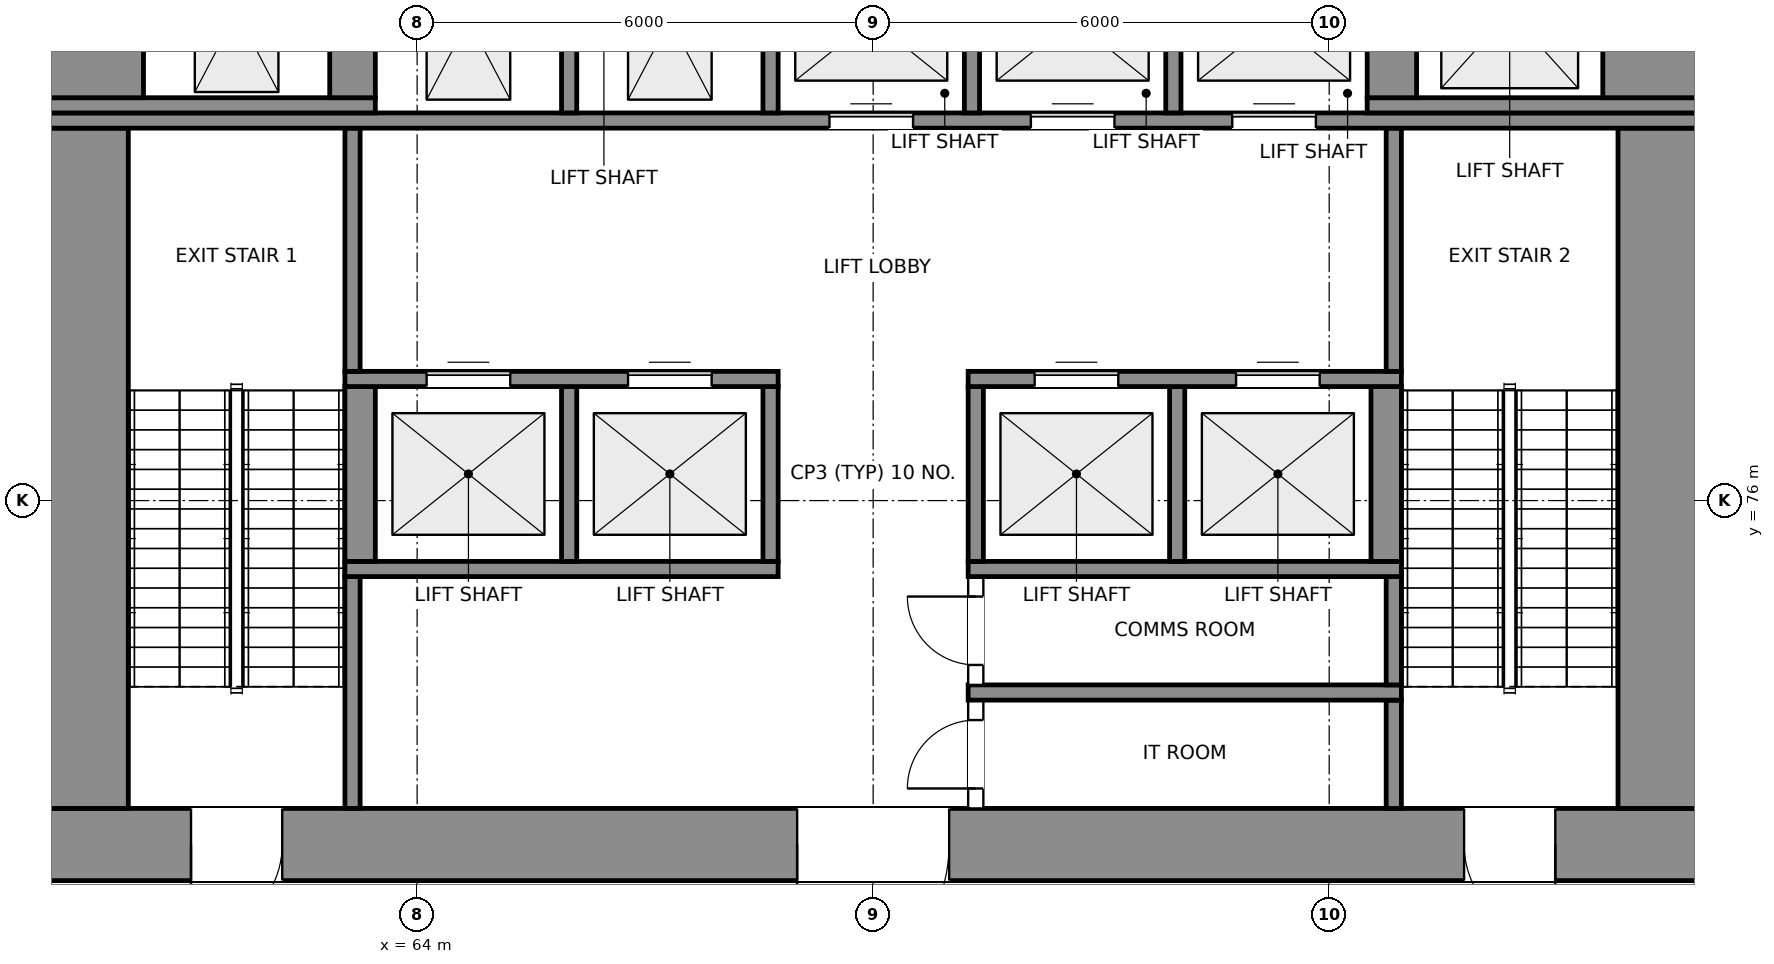
"""IFC4 building model, lengths in metres.
Left out: names, types, materials, properties, quantities, classifications, styles, units other than length and angle.
Written with IfcOpenShell. Run it as: python <this file> out.ifc"""

import sys

from ifc_helpers import new_model, si_unit, direction, frame, frame_2d, origin, place, context, subcontext, project, spatial, rectangle, extrude, element, fill, save


model = new_model("IFC4")
c1 = context("Model", 3, precision=1e-05, world=origin(), true_north=direction((0.0, 1.0)))
c2 = subcontext(c1, "Body", "Model", "MODEL_VIEW")
j1 = project(units=[si_unit("LENGTHUNIT", "METRE"), si_unit("PLANEANGLEUNIT", "RADIAN")], contexts=[c1])
p1 = place(None, origin())
s1 = spatial("IfcSite", under=j1, at=p1, CompositionType="ELEMENT")
p2 = place(p1, origin())
s2 = spatial("IfcBuilding", under=s1, at=p2, CompositionType="ELEMENT")
p3 = place(p2, frame((0.0, 0.0, 142.6)))
s3 = spatial("IfcBuildingStorey", under=s2, at=p3, CompositionType="ELEMENT", Elevation=142.6)
p4 = place(p3, frame((59.0, 71.475, 0.0), z_axis=(0.0, 0.0, 1.0), x_axis=(1.0, 0.0, 0.0)))
e1 = element("IfcWall", 1, at=p4, inside=s3, PredefinedType="SHEAR", context=c2, shape_type="SweptSolid", body=[
    extrude(rectangle(XDim=22.0, YDim=0.95, at=frame_2d((11.0, 0.0))), origin(), (0.0, 0.0, 1.0), 6.0),
])
p5 = place(p4, frame((2.025, 0.0, 0.0)))
e2 = element("IfcOpeningElement", 2, at=p5, cuts=e1, PredefinedType="OPENING", context=c2, shape_type="SweptSolid", body=[
    extrude(rectangle(XDim=1.2, YDim=2.1, at=frame_2d((0.6, 1.05))), frame((0.0, 0.485, 0.0), z_axis=(0.0, -1.0, 0.0), x_axis=(1.0, 0.0, 0.0)), (0.0, 0.0, 1.0), 0.97),
])
p6 = place(p4, frame((18.775, 0.0, 0.0)))
e3 = element("IfcOpeningElement", 3, at=p6, cuts=e1, PredefinedType="OPENING", context=c2, shape_type="SweptSolid", body=[
    extrude(rectangle(XDim=1.2, YDim=2.1, at=frame_2d((0.6, 1.05))), frame((0.0, 0.485, 0.0), z_axis=(0.0, -1.0, 0.0), x_axis=(1.0, 0.0, 0.0)), (0.0, 0.0, 1.0), 0.97),
])
p7 = place(p4, frame((10.0, 0.0, 0.0)))
e4 = element("IfcOpeningElement", 4, at=p7, cuts=e1, PredefinedType="OPENING", context=c2, shape_type="SweptSolid", body=[
    extrude(rectangle(XDim=2.0, YDim=2.1, at=frame_2d((1.0, 1.05))), frame((0.0, 0.485, 0.0), z_axis=(0.0, -1.0, 0.0), x_axis=(1.0, 0.0, 0.0)), (0.0, 0.0, 1.0), 0.97),
])
p8 = place(p3, frame((59.6, 71.95, 0.0), z_axis=(0.0, 0.0, 1.0), x_axis=(0.0, 1.0, 0.0)))
e5 = element("IfcWall", 5, at=p8, inside=s3, PredefinedType="SHEAR", context=c2, shape_type="SweptSolid", body=[
    extrude(rectangle(XDim=8.95, YDim=1.2, at=frame_2d((4.475, 0.0))), origin(), (0.0, 0.0, 1.0), 6.0),
])
p9 = place(p3, frame((63.15, 71.95, 0.0), z_axis=(0.0, 0.0, 1.0), x_axis=(0.0, 1.0, 0.0)))
e6 = element("IfcWall", 6, at=p9, inside=s3, PredefinedType="SHEAR", context=c2, shape_type="SweptSolid", body=[
    extrude(rectangle(XDim=3.05, YDim=0.2, at=frame_2d((1.525, 0.0))), origin(), (0.0, 0.0, 1.0), 6.0),
])
p10 = place(p3, frame((71.35, 71.95, 0.0), z_axis=(0.0, 0.0, 1.0), x_axis=(0.0, 1.0, 0.0)))
e7 = element("IfcWall", 7, at=p10, inside=s3, PredefinedType="PARTITIONING", context=c2, shape_type="SweptSolid", body=[
    extrude(rectangle(XDim=1.425, YDim=0.2, at=frame_2d((0.712, 0.0))), origin(), (0.0, 0.0, 1.0), 5.7),
])
p11 = place(p10, frame((0.262, 0.0, 0.0)))
e8 = element("IfcOpeningElement", 8, at=p11, cuts=e7, PredefinedType="OPENING", context=c2, shape_type="SweptSolid", body=[
    extrude(rectangle(XDim=0.9, YDim=2.1, at=frame_2d((0.45, 1.05))), frame((0.0, 0.11, 0.0), z_axis=(0.0, -1.0, 0.0), x_axis=(1.0, 0.0, 0.0)), (0.0, 0.0, 1.0), 0.22),
])
p12 = place(p3, frame((76.85, 71.95, 0.0), z_axis=(0.0, 0.0, 1.0), x_axis=(0.0, 1.0, 0.0)))
e9 = element("IfcWall", 9, at=p12, inside=s3, PredefinedType="SHEAR", context=c2, shape_type="SweptSolid", body=[
    extrude(rectangle(XDim=1.425, YDim=0.2, at=frame_2d((0.712, 0.0))), origin(), (0.0, 0.0, 1.0), 6.0),
])
p13 = place(p3, frame((80.4, 71.95, 0.0), z_axis=(0.0, 0.0, 1.0), x_axis=(0.0, 1.0, 0.0)))
e10 = element("IfcWall", 10, at=p13, inside=s3, PredefinedType="SHEAR", context=c2, shape_type="SweptSolid", body=[
    extrude(rectangle(XDim=8.95, YDim=1.2, at=frame_2d((4.475, 0.0))), origin(), (0.0, 0.0, 1.0), 6.0),
])
p14 = place(p3, frame((71.25, 73.475, 0.0), z_axis=(0.0, 0.0, 1.0), x_axis=(1.0, 0.0, 0.0)))
e11 = element("IfcWall", 11, at=p14, inside=s3, PredefinedType="SHEAR", context=c2, shape_type="SweptSolid", body=[
    extrude(rectangle(XDim=5.7, YDim=0.2, at=frame_2d((2.85, 0.0))), origin(), (0.0, 0.0, 1.0), 6.0),
])
p15 = place(p3, frame((71.35, 73.575, 0.0), z_axis=(0.0, 0.0, 1.0), x_axis=(0.0, 1.0, 0.0)))
e12 = element("IfcWall", 12, at=p15, inside=s3, PredefinedType="PARTITIONING", context=c2, shape_type="SweptSolid", body=[
    extrude(rectangle(XDim=1.425, YDim=0.2, at=frame_2d((0.712, 0.0))), origin(), (0.0, 0.0, 1.0), 5.7),
])
p16 = place(p15, frame((0.262, 0.0, 0.0)))
e13 = element("IfcOpeningElement", 13, at=p16, cuts=e12, PredefinedType="OPENING", context=c2, shape_type="SweptSolid", body=[
    extrude(rectangle(XDim=0.9, YDim=2.1, at=frame_2d((0.45, 1.05))), frame((0.0, 0.11, 0.0), z_axis=(0.0, -1.0, 0.0), x_axis=(1.0, 0.0, 0.0)), (0.0, 0.0, 1.0), 0.22),
])
p17 = place(p3, frame((76.85, 73.575, 0.0), z_axis=(0.0, 0.0, 1.0), x_axis=(0.0, 1.0, 0.0)))
e14 = element("IfcWall", 14, at=p17, inside=s3, PredefinedType="SHEAR", context=c2, shape_type="SweptSolid", body=[
    extrude(rectangle(XDim=1.425, YDim=0.2, at=frame_2d((0.712, 0.0))), origin(), (0.0, 0.0, 1.0), 6.0),
])
for number, where, z_axis, x_axis in (
    (15, (63.05, 75.1, 0.0), (0.0, 0.0, 1.0), (1.0, 0.0, 0.0)),
    (16, (71.25, 75.1, 0.0), (0.0, 0.0, 1.0), (1.0, 0.0, 0.0)),
):
    element("IfcWall", number, at=place(p3, frame(where, z_axis=z_axis, x_axis=x_axis)), inside=s3, PredefinedType="SHEAR", context=c2, shape_type="SweptSolid", body=[
        extrude(rectangle(XDim=5.7, YDim=0.2, at=frame_2d((2.85, 0.0))), origin(), (0.0, 0.0, 1.0), 6.0),
    ])
p18 = place(p3, frame((63.25, 75.2, 0.0), z_axis=(0.0, 0.0, 1.0), x_axis=(0.0, 1.0, 0.0)))
e17 = element("IfcWall", 17, at=p18, inside=s3, PredefinedType="SHEAR", context=c2, shape_type="SweptSolid", body=[
    extrude(rectangle(XDim=2.3, YDim=0.4, at=frame_2d((1.15, 0.0))), origin(), (0.0, 0.0, 1.0), 6.0),
])
for number, where, z_axis, x_axis in (
    (18, (66.0, 75.2, 0.0), (0.0, 0.0, 1.0), (0.0, 1.0, 0.0)),
    (19, (68.65, 75.2, 0.0), (0.0, 0.0, 1.0), (0.0, 1.0, 0.0)),
    (20, (71.35, 75.2, 0.0), (0.0, 0.0, 1.0), (0.0, 1.0, 0.0)),
    (21, (74.0, 75.2, 0.0), (0.0, 0.0, 1.0), (0.0, 1.0, 0.0)),
):
    element("IfcWall", number, at=place(p3, frame(where, z_axis=z_axis, x_axis=x_axis)), inside=s3, PredefinedType="SHEAR", context=c2, shape_type="SweptSolid", body=[
        extrude(rectangle(XDim=2.3, YDim=0.2, at=frame_2d((1.15, 0.0))), origin(), (0.0, 0.0, 1.0), 6.0),
    ])
p19 = place(p3, frame((76.75, 75.2, 0.0), z_axis=(0.0, 0.0, 1.0), x_axis=(0.0, 1.0, 0.0)))
e22 = element("IfcWall", 22, at=p19, inside=s3, PredefinedType="SHEAR", context=c2, shape_type="SweptSolid", body=[
    extrude(rectangle(XDim=2.3, YDim=0.4, at=frame_2d((1.15, 0.0))), origin(), (0.0, 0.0, 1.0), 6.0),
])
p20 = place(p3, frame((63.05, 77.6, 0.0), z_axis=(0.0, 0.0, 1.0), x_axis=(1.0, 0.0, 0.0)))
e23 = element("IfcWall", 23, at=p20, inside=s3, PredefinedType="SHEAR", context=c2, shape_type="SweptSolid", body=[
    extrude(rectangle(XDim=5.7, YDim=0.2, at=frame_2d((2.85, 0.0))), origin(), (0.0, 0.0, 1.0), 6.0),
])
p21 = place(p20, frame((1.075, 0.0, 0.0)))
e24 = element("IfcOpeningElement", 24, at=p21, cuts=e23, PredefinedType="OPENING", context=c2, shape_type="SweptSolid", body=[
    extrude(rectangle(XDim=1.1, YDim=2.1, at=frame_2d((0.55, 1.05))), frame((0.0, 0.11, 0.0), z_axis=(0.0, -1.0, 0.0), x_axis=(1.0, 0.0, 0.0)), (0.0, 0.0, 1.0), 0.22),
])
p22 = place(p20, frame((3.725, 0.0, 0.0)))
e25 = element("IfcOpeningElement", 25, at=p22, cuts=e23, PredefinedType="OPENING", context=c2, shape_type="SweptSolid", body=[
    extrude(rectangle(XDim=1.1, YDim=2.1, at=frame_2d((0.55, 1.05))), frame((0.0, 0.11, 0.0), z_axis=(0.0, -1.0, 0.0), x_axis=(1.0, 0.0, 0.0)), (0.0, 0.0, 1.0), 0.22),
])
p23 = place(p3, frame((71.25, 77.6, 0.0), z_axis=(0.0, 0.0, 1.0), x_axis=(1.0, 0.0, 0.0)))
e26 = element("IfcWall", 26, at=p23, inside=s3, PredefinedType="SHEAR", context=c2, shape_type="SweptSolid", body=[
    extrude(rectangle(XDim=5.7, YDim=0.2, at=frame_2d((2.85, 0.0))), origin(), (0.0, 0.0, 1.0), 6.0),
])
p24 = place(p23, frame((0.875, 0.0, 0.0)))
e27 = element("IfcOpeningElement", 27, at=p24, cuts=e26, PredefinedType="OPENING", context=c2, shape_type="SweptSolid", body=[
    extrude(rectangle(XDim=1.1, YDim=2.1, at=frame_2d((0.55, 1.05))), frame((0.0, 0.11, 0.0), z_axis=(0.0, -1.0, 0.0), x_axis=(1.0, 0.0, 0.0)), (0.0, 0.0, 1.0), 0.22),
])
p25 = place(p23, frame((3.525, 0.0, 0.0)))
e28 = element("IfcOpeningElement", 28, at=p25, cuts=e26, PredefinedType="OPENING", context=c2, shape_type="SweptSolid", body=[
    extrude(rectangle(XDim=1.1, YDim=2.1, at=frame_2d((0.55, 1.05))), frame((0.0, 0.11, 0.0), z_axis=(0.0, -1.0, 0.0), x_axis=(1.0, 0.0, 0.0)), (0.0, 0.0, 1.0), 0.22),
])
for number, where, z_axis, x_axis in (
    (29, (63.15, 77.7, 0.0), (0.0, 0.0, 1.0), (0.0, 1.0, 0.0)),
    (30, (76.85, 77.7, 0.0), (0.0, 0.0, 1.0), (0.0, 1.0, 0.0)),
):
    element("IfcWall", number, at=place(p3, frame(where, z_axis=z_axis, x_axis=x_axis)), inside=s3, PredefinedType="SHEAR", context=c2, shape_type="SweptSolid", body=[
        extrude(rectangle(XDim=3.2, YDim=0.2, at=frame_2d((1.6, 0.0))), origin(), (0.0, 0.0, 1.0), 6.0),
    ])
p26 = place(p3, frame((59.0, 81.0, 0.0), z_axis=(0.0, 0.0, 1.0), x_axis=(1.0, 0.0, 0.0)))
e31 = element("IfcWall", 31, at=p26, inside=s3, PredefinedType="SHEAR", context=c2, shape_type="SweptSolid", body=[
    extrude(rectangle(XDim=22.0, YDim=0.2, at=frame_2d((11.0, 0.0))), origin(), (0.0, 0.0, 1.0), 6.0),
])
p27 = place(p26, frame((10.425, 0.0, 0.0)))
e32 = element("IfcOpeningElement", 32, at=p27, cuts=e31, PredefinedType="OPENING", context=c2, shape_type="SweptSolid", body=[
    extrude(rectangle(XDim=1.1, YDim=2.1, at=frame_2d((0.55, 1.05))), frame((0.0, 0.11, 0.0), z_axis=(0.0, -1.0, 0.0), x_axis=(1.0, 0.0, 0.0)), (0.0, 0.0, 1.0), 0.22),
])
p28 = place(p26, frame((13.075, 0.0, 0.0)))
e33 = element("IfcOpeningElement", 33, at=p28, cuts=e31, PredefinedType="OPENING", context=c2, shape_type="SweptSolid", body=[
    extrude(rectangle(XDim=1.1, YDim=2.1, at=frame_2d((0.55, 1.05))), frame((0.0, 0.11, 0.0), z_axis=(0.0, -1.0, 0.0), x_axis=(1.0, 0.0, 0.0)), (0.0, 0.0, 1.0), 0.22),
])
p29 = place(p26, frame((15.725, 0.0, 0.0)))
e34 = element("IfcOpeningElement", 34, at=p29, cuts=e31, PredefinedType="OPENING", context=c2, shape_type="SweptSolid", body=[
    extrude(rectangle(XDim=1.1, YDim=2.1, at=frame_2d((0.55, 1.05))), frame((0.0, 0.11, 0.0), z_axis=(0.0, -1.0, 0.0), x_axis=(1.0, 0.0, 0.0)), (0.0, 0.0, 1.0), 0.22),
])
p30 = place(p3, frame((59.0, 81.2, 0.0), z_axis=(0.0, 0.0, 1.0), x_axis=(1.0, 0.0, 0.0)))
e35 = element("IfcWall", 35, at=p30, inside=s3, PredefinedType="SHEAR", context=c2, shape_type="SweptSolid", body=[
    extrude(rectangle(XDim=4.45, YDim=0.2, at=frame_2d((2.225, 0.0))), origin(), (0.0, 0.0, 1.0), 6.0),
])
for number, where, z_axis, x_axis in (
    (36, (66.0, 81.1, 0.0), (0.0, 0.0, 1.0), (0.0, 1.0, 0.0)),
    (37, (68.65, 81.1, 0.0), (0.0, 0.0, 1.0), (0.0, 1.0, 0.0)),
    (38, (71.3, 81.1, 0.0), (0.0, 0.0, 1.0), (0.0, 1.0, 0.0)),
    (39, (73.95, 81.1, 0.0), (0.0, 0.0, 1.0), (0.0, 1.0, 0.0)),
):
    element("IfcWall", number, at=place(p3, frame(where, z_axis=z_axis, x_axis=x_axis)), inside=s3, PredefinedType="SHEAR", context=c2, shape_type="SweptSolid", body=[
        extrude(rectangle(XDim=2.45, YDim=0.2, at=frame_2d((1.225, 0.0))), origin(), (0.0, 0.0, 1.0), 6.0),
    ])
p31 = place(p3, frame((76.5, 81.2, 0.0), z_axis=(0.0, 0.0, 1.0), x_axis=(1.0, 0.0, 0.0)))
e40 = element("IfcWall", 40, at=p31, inside=s3, PredefinedType="SHEAR", context=c2, shape_type="SweptSolid", body=[
    extrude(rectangle(XDim=4.5, YDim=0.2, at=frame_2d((2.25, 0.0))), origin(), (0.0, 0.0, 1.0), 6.0),
])
p32 = place(p3, frame((59.7, 81.3, 0.0), z_axis=(0.0, 0.0, 1.0), x_axis=(0.0, 1.0, 0.0)))
e41 = element("IfcWall", 41, at=p32, inside=s3, PredefinedType="SHEAR", context=c2, shape_type="SweptSolid", body=[
    extrude(rectangle(XDim=2.25, YDim=1.4, at=frame_2d((1.125, 0.0))), origin(), (0.0, 0.0, 1.0), 6.0),
])
p33 = place(p3, frame((63.15, 81.3, 0.0), z_axis=(0.0, 0.0, 1.0), x_axis=(0.0, 1.0, 0.0)))
e42 = element("IfcWall", 42, at=p33, inside=s3, PredefinedType="SHEAR", context=c2, shape_type="SweptSolid", body=[
    extrude(rectangle(XDim=2.25, YDim=0.6, at=frame_2d((1.125, 0.0))), origin(), (0.0, 0.0, 1.0), 6.0),
])
p34 = place(p3, frame((76.825, 81.3, 0.0), z_axis=(0.0, 0.0, 1.0), x_axis=(0.0, 1.0, 0.0)))
e43 = element("IfcWall", 43, at=p34, inside=s3, PredefinedType="SHEAR", context=c2, shape_type="SweptSolid", body=[
    extrude(rectangle(XDim=2.25, YDim=0.65, at=frame_2d((1.125, 0.0))), origin(), (0.0, 0.0, 1.0), 6.0),
])
p35 = place(p3, frame((80.3, 81.3, 0.0), z_axis=(0.0, 0.0, 1.0), x_axis=(0.0, 1.0, 0.0)))
e44 = element("IfcWall", 44, at=p35, inside=s3, PredefinedType="SHEAR", context=c2, shape_type="SweptSolid", body=[
    extrude(rectangle(XDim=2.25, YDim=1.4, at=frame_2d((1.125, 0.0))), origin(), (0.0, 0.0, 1.0), 6.0),
])
p36 = place(p5, frame((1.2, 0.0, 0.0), z_axis=(0.0, 0.0, 1.0), x_axis=(-1.0, 0.0, 0.0)))
e45 = element("IfcDoor", 45, at=p36, inside=s3, OperationType="SINGLE_SWING_RIGHT", PredefinedType="DOOR", context=c2, shape_type="SweptSolid", body=[
    extrude(rectangle(XDim=1.2, YDim=2.1, at=frame_2d((0.6, 1.05))), frame((0.0, 0.025, 0.0), z_axis=(0.0, -1.0, 0.0), x_axis=(1.0, 0.0, 0.0)), (0.0, 0.0, 1.0), 0.05),
])
fill(e2, e45)
p37 = place(p6, frame((1.2, 0.0, 0.0), z_axis=(0.0, 0.0, 1.0), x_axis=(-1.0, 0.0, 0.0)))
e46 = element("IfcDoor", 46, at=p37, inside=s3, OperationType="SINGLE_SWING_LEFT", PredefinedType="DOOR", context=c2, shape_type="SweptSolid", body=[
    extrude(rectangle(XDim=1.2, YDim=2.1, at=frame_2d((0.6, 1.05))), frame((0.0, 0.025, 0.0), z_axis=(0.0, -1.0, 0.0), x_axis=(1.0, 0.0, 0.0)), (0.0, 0.0, 1.0), 0.05),
])
fill(e3, e46)
p38 = place(p7, frame((2.0, 0.0, 0.0), z_axis=(0.0, 0.0, 1.0), x_axis=(-1.0, 0.0, 0.0)))
e47 = element("IfcDoor", 47, at=p38, inside=s3, OperationType="DOUBLE_DOOR_SINGLE_SWING", PredefinedType="DOOR", context=c2, shape_type="SweptSolid", body=[
    extrude(rectangle(XDim=2.0, YDim=2.1, at=frame_2d((1.0, 1.05))), frame((0.0, 0.025, 0.0), z_axis=(0.0, -1.0, 0.0), x_axis=(1.0, 0.0, 0.0)), (0.0, 0.0, 1.0), 0.05),
])
fill(e4, e47)
p39 = place(p11, origin())
e48 = element("IfcDoor", 48, at=p39, inside=s3, OperationType="SINGLE_SWING_LEFT", PredefinedType="DOOR", context=c2, shape_type="SweptSolid", body=[
    extrude(rectangle(XDim=0.9, YDim=2.1, at=frame_2d((0.45, 1.05))), frame((0.0, 0.025, 0.0), z_axis=(0.0, -1.0, 0.0), x_axis=(1.0, 0.0, 0.0)), (0.0, 0.0, 1.0), 0.05),
])
fill(e8, e48)
p40 = place(p16, origin())
e49 = element("IfcDoor", 49, at=p40, inside=s3, OperationType="SINGLE_SWING_RIGHT", PredefinedType="DOOR", context=c2, shape_type="SweptSolid", body=[
    extrude(rectangle(XDim=0.9, YDim=2.1, at=frame_2d((0.45, 1.05))), frame((0.0, 0.025, 0.0), z_axis=(0.0, -1.0, 0.0), x_axis=(1.0, 0.0, 0.0)), (0.0, 0.0, 1.0), 0.05),
])
fill(e13, e49)
p41 = place(p21, origin())
e50 = element("IfcDoor", 50, at=p41, inside=s3, OperationType="DOUBLE_DOOR_SLIDING", PredefinedType="DOOR", context=c2, shape_type="SweptSolid", body=[
    extrude(rectangle(XDim=1.1, YDim=2.1, at=frame_2d((0.55, 1.05))), frame((0.0, 0.025, 0.0), z_axis=(0.0, -1.0, 0.0), x_axis=(1.0, 0.0, 0.0)), (0.0, 0.0, 1.0), 0.05),
])
fill(e24, e50)
p42 = place(p22, origin())
e51 = element("IfcDoor", 51, at=p42, inside=s3, OperationType="DOUBLE_DOOR_SLIDING", PredefinedType="DOOR", context=c2, shape_type="SweptSolid", body=[
    extrude(rectangle(XDim=1.1, YDim=2.1, at=frame_2d((0.55, 1.05))), frame((0.0, 0.025, 0.0), z_axis=(0.0, -1.0, 0.0), x_axis=(1.0, 0.0, 0.0)), (0.0, 0.0, 1.0), 0.05),
])
fill(e25, e51)
p43 = place(p24, origin())
e52 = element("IfcDoor", 52, at=p43, inside=s3, OperationType="DOUBLE_DOOR_SLIDING", PredefinedType="DOOR", context=c2, shape_type="SweptSolid", body=[
    extrude(rectangle(XDim=1.1, YDim=2.1, at=frame_2d((0.55, 1.05))), frame((0.0, 0.025, 0.0), z_axis=(0.0, -1.0, 0.0), x_axis=(1.0, 0.0, 0.0)), (0.0, 0.0, 1.0), 0.05),
])
fill(e27, e52)
p44 = place(p25, origin())
e53 = element("IfcDoor", 53, at=p44, inside=s3, OperationType="DOUBLE_DOOR_SLIDING", PredefinedType="DOOR", context=c2, shape_type="SweptSolid", body=[
    extrude(rectangle(XDim=1.1, YDim=2.1, at=frame_2d((0.55, 1.05))), frame((0.0, 0.025, 0.0), z_axis=(0.0, -1.0, 0.0), x_axis=(1.0, 0.0, 0.0)), (0.0, 0.0, 1.0), 0.05),
])
fill(e28, e53)
p45 = place(p27, origin())
e54 = element("IfcDoor", 54, at=p45, inside=s3, OperationType="DOUBLE_DOOR_SLIDING", PredefinedType="DOOR", context=c2, shape_type="SweptSolid", body=[
    extrude(rectangle(XDim=1.1, YDim=2.1, at=frame_2d((0.55, 1.05))), frame((0.0, 0.025, 0.0), z_axis=(0.0, -1.0, 0.0), x_axis=(1.0, 0.0, 0.0)), (0.0, 0.0, 1.0), 0.05),
])
fill(e32, e54)
p46 = place(p28, origin())
e55 = element("IfcDoor", 55, at=p46, inside=s3, OperationType="DOUBLE_DOOR_SLIDING", PredefinedType="DOOR", context=c2, shape_type="SweptSolid", body=[
    extrude(rectangle(XDim=1.1, YDim=2.1, at=frame_2d((0.55, 1.05))), frame((0.0, 0.025, 0.0), z_axis=(0.0, -1.0, 0.0), x_axis=(1.0, 0.0, 0.0)), (0.0, 0.0, 1.0), 0.05),
])
fill(e33, e55)
p47 = place(p29, origin())
e56 = element("IfcDoor", 56, at=p47, inside=s3, OperationType="DOUBLE_DOOR_SLIDING", PredefinedType="DOOR", context=c2, shape_type="SweptSolid", body=[
    extrude(rectangle(XDim=1.1, YDim=2.1, at=frame_2d((0.55, 1.05))), frame((0.0, 0.025, 0.0), z_axis=(0.0, -1.0, 0.0), x_axis=(1.0, 0.0, 0.0)), (0.0, 0.0, 1.0), 0.05),
])
fill(e34, e56)
save(model, sys.argv[1])
